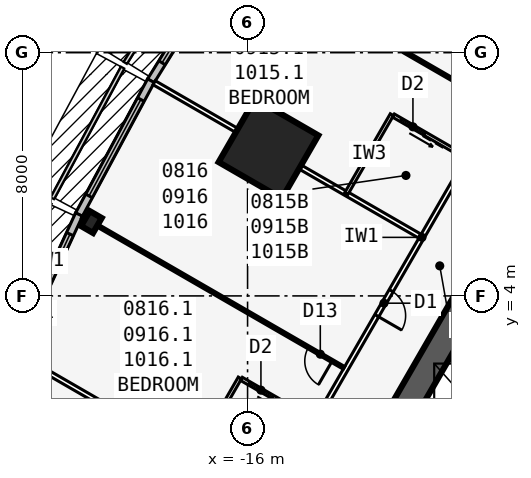
"""IFC4 building model, lengths in metres.
Left out: names, types, materials, properties, quantities, classifications, styles, units other than length and angle.
Written with IfcOpenShell. Run it as: python <this file> out.ifc"""

import sys

from ifc_helpers import new_model, si_unit, direction, frame, frame_2d, origin, origin_2d, place, context, subcontext, project, spatial, rectangle, i_section, extrude, element, fill, save


model = new_model("IFC4")
c1 = context("Model", 3, precision=1e-05, world=origin(), true_north=direction((0.0, 1.0)))
c2 = subcontext(c1, "Body", "Model", "MODEL_VIEW")
j1 = project(units=[si_unit("LENGTHUNIT", "METRE"), si_unit("PLANEANGLEUNIT", "RADIAN")], contexts=[c1])
p1 = place(None, origin())
s1 = spatial("IfcSite", under=j1, at=p1, CompositionType="ELEMENT")
p2 = place(p1, origin())
s2 = spatial("IfcBuilding", under=s1, at=p2, CompositionType="ELEMENT")
p3 = place(p2, frame((0.0, 0.0, 38.7)))
s3 = spatial("IfcBuildingStorey", under=s2, at=p3, CompositionType="ELEMENT", Elevation=38.7)
p4 = place(p3, frame((0.0, 19.052, 0.0), z_axis=(0.0, 0.0, 1.0), x_axis=(-0.499999749417, -0.866025548458, 0.0)))
e1 = element("IfcWall", 1, at=p4, inside=s3, PredefinedType="SHEAR", context=c2, shape_type="SweptSolid", body=[
    extrude(rectangle(XDim=33.0, YDim=0.9, at=frame_2d((16.5, 0.0))), origin(), (0.0, 0.0, 1.0), 3.4),
])
p5 = place(p4, frame((14.15, 0.0, 0.0)))
e2 = element("IfcOpeningElement", 2, at=p5, cuts=e1, PredefinedType="OPENING", context=c2, shape_type="SweptSolid", body=[
    extrude(rectangle(XDim=1.8, YDim=2.13, at=frame_2d((0.9, 1.065))), frame((0.0, 0.46, 0.0), z_axis=(0.0, -1.0, 0.0), x_axis=(1.0, 0.0, 0.0)), (0.0, 0.0, 1.0), 0.92),
])
p6 = place(p4, frame((12.6, 0.0, 0.0)))
e3 = element("IfcOpeningElement", 3, at=p6, cuts=e1, PredefinedType="OPENING", context=c2, shape_type="SweptSolid", body=[
    extrude(rectangle(XDim=1.0, YDim=2.13, at=frame_2d((0.5, 1.065))), frame((0.0, 0.46, 0.0), z_axis=(0.0, -1.0, 0.0), x_axis=(1.0, 0.0, 0.0)), (0.0, 0.0, 1.0), 0.92),
])
p7 = place(p3, frame((-4.929, 3.365, 0.0), z_axis=(0.0, 0.0, 1.0), x_axis=(-0.499991433582, -0.866030349552, 0.0)))
e4 = element("IfcWall", 4, at=p7, inside=s3, PredefinedType="SOLIDWALL", context=c2, shape_type="SweptSolid", body=[
    extrude(rectangle(XDim=10.633, YDim=0.25, at=frame_2d((5.316, 0.0))), origin(), (0.0, 0.0, 1.0), 3.235),
])
p8 = place(p7, frame((9.164, 0.0, 0.0)))
e5 = element("IfcOpeningElement", 5, at=p8, cuts=e4, PredefinedType="OPENING", context=c2, shape_type="SweptSolid", body=[
    extrude(rectangle(XDim=0.9, YDim=2.13, at=frame_2d((0.45, 1.065))), frame((0.0, 0.135, 0.0), z_axis=(0.0, -1.0, 0.0), x_axis=(1.0, 0.0, 0.0)), (0.0, 0.0, 1.0), 0.27),
])
p9 = place(p3, frame((-21.137, 6.43, 0.0), z_axis=(0.0, 0.0, 1.0), x_axis=(-0.866025403784, 0.5, 0.0)))
e6 = element("IfcColumn", 6, at=p9, inside=s3, PredefinedType="COLUMN", context=c2, shape_type="SweptSolid", body=[
    extrude(i_section(OverallWidth=0.455, OverallDepth=0.569, WebThickness=0.078, FlangeThickness=0.125, at=origin_2d()), origin(), (0.0, 0.0, 1.0), 3.4),
])
p10 = place(p3, frame((-15.312, 8.84, 0.0), z_axis=(0.0, 0.0, 1.0), x_axis=(-0.866025403784, 0.5, 0.0)))
e7 = element("IfcColumn", 7, at=p10, inside=s3, PredefinedType="COLUMN", context=c2, shape_type="SweptSolid", body=[
    extrude(rectangle(XDim=2.4, YDim=2.4, at=origin_2d()), origin(), (0.0, 0.0, 1.0), 3.4),
])
p11 = place(p3, frame((-16.551, 15.324, 0.0), z_axis=(0.0, 0.0, 1.0), x_axis=(-0.526132807704, -0.850402415717, 0.0)))
e8 = element("IfcWall", 8, at=p11, inside=s3, PredefinedType="STANDARD", context=c2, shape_type="SweptSolid", body=[
    extrude(rectangle(XDim=5.002, YDim=0.25, at=frame_2d((2.501, 0.0))), origin(), (0.0, 0.0, 1.0), 3.235),
])
p12 = place(p11, frame((0.701, 0.0, 0.45)))
e9 = element("IfcOpeningElement", 9, at=p12, cuts=e8, PredefinedType="OPENING", context=c2, shape_type="SweptSolid", body=[
    extrude(rectangle(XDim=3.6, YDim=2.4, at=frame_2d((1.8, 1.2))), frame((0.0, 0.135, 0.0), z_axis=(0.0, -1.0, 0.0), x_axis=(1.0, 0.0, 0.0)), (0.0, 0.0, 1.0), 0.27),
])
p13 = place(p3, frame((-19.178, 11.077, 0.0), z_axis=(0.0, 0.0, 1.0), x_axis=(-0.473412820489, -0.880840678782, 0.0)))
e10 = element("IfcWall", 10, at=p13, inside=s3, PredefinedType="STANDARD", context=c2, shape_type="SweptSolid", body=[
    extrude(rectangle(XDim=5.002, YDim=0.25, at=frame_2d((2.501, 0.0))), origin(), (0.0, 0.0, 1.0), 3.235),
])
p14 = place(p13, frame((0.701, 0.0, 0.45)))
e11 = element("IfcOpeningElement", 11, at=p14, cuts=e10, PredefinedType="OPENING", context=c2, shape_type="SweptSolid", body=[
    extrude(rectangle(XDim=3.6, YDim=2.4, at=frame_2d((1.8, 1.2))), frame((0.0, 0.135, 0.0), z_axis=(0.0, -1.0, 0.0), x_axis=(1.0, 0.0, 0.0)), (0.0, 0.0, 1.0), 0.27),
])
p15 = place(p3, frame((-21.543, 6.678, 0.0), z_axis=(0.0, 0.0, 1.0), x_axis=(-0.419203100754, -0.907892482796, 0.0)))
e12 = element("IfcWall", 12, at=p15, inside=s3, PredefinedType="STANDARD", context=c2, shape_type="SweptSolid", body=[
    extrude(rectangle(XDim=5.021, YDim=0.25, at=frame_2d((2.51, 0.0))), origin(), (0.0, 0.0, 1.0), 3.235),
])
p16 = place(p15, frame((0.71, 0.0, 0.45)))
e13 = element("IfcOpeningElement", 13, at=p16, cuts=e12, PredefinedType="OPENING", context=c2, shape_type="SweptSolid", body=[
    extrude(rectangle(XDim=3.6, YDim=2.4, at=frame_2d((1.8, 1.2))), frame((0.0, 0.135, 0.0), z_axis=(0.0, -1.0, 0.0), x_axis=(1.0, 0.0, 0.0)), (0.0, 0.0, 1.0), 0.27),
])
p17 = place(p3, frame((-0.5, 22.836, 0.0), z_axis=(0.0, 0.0, 1.0), x_axis=(-0.500001677587, -0.866024435227, 0.0)))
e14 = element("IfcWall", 14, at=p17, inside=s3, PredefinedType="PARTITIONING", context=c2, shape_type="SweptSolid", body=[
    extrude(rectangle(XDim=39.054, YDim=0.15, at=frame_2d((19.527, 0.0))), origin(), (0.0, 0.0, 1.0), 3.235),
])
p18 = place(p17, frame((0.352, 0.0, 0.0)))
e15 = element("IfcOpeningElement", 15, at=p18, cuts=e14, PredefinedType="OPENING", context=c2, shape_type="SweptSolid", body=[
    extrude(rectangle(XDim=0.95, YDim=2.13, at=frame_2d((0.475, 1.065))), frame((0.0, 0.085, 0.0), z_axis=(0.0, -1.0, 0.0), x_axis=(1.0, 0.0, 0.0)), (0.0, 0.0, 1.0), 0.17),
])
p19 = place(p17, frame((5.952, 0.0, 0.0)))
e16 = element("IfcOpeningElement", 16, at=p19, cuts=e14, PredefinedType="OPENING", context=c2, shape_type="SweptSolid", body=[
    extrude(rectangle(XDim=0.95, YDim=2.13, at=frame_2d((0.475, 1.065))), frame((0.0, 0.085, 0.0), z_axis=(0.0, -1.0, 0.0), x_axis=(1.0, 0.0, 0.0)), (0.0, 0.0, 1.0), 0.17),
])
p20 = place(p17, frame((11.552, 0.0, 0.0)))
e17 = element("IfcOpeningElement", 17, at=p20, cuts=e14, PredefinedType="OPENING", context=c2, shape_type="SweptSolid", body=[
    extrude(rectangle(XDim=0.95, YDim=2.13, at=frame_2d((0.475, 1.065))), frame((0.0, 0.085, 0.0), z_axis=(0.0, -1.0, 0.0), x_axis=(1.0, 0.0, 0.0)), (0.0, 0.0, 1.0), 0.17),
])
p21 = place(p17, frame((21.552, 0.0, 0.0)))
e18 = element("IfcOpeningElement", 18, at=p21, cuts=e14, PredefinedType="OPENING", context=c2, shape_type="SweptSolid", body=[
    extrude(rectangle(XDim=0.95, YDim=2.13, at=frame_2d((0.475, 1.065))), frame((0.0, 0.085, 0.0), z_axis=(0.0, -1.0, 0.0), x_axis=(1.0, 0.0, 0.0)), (0.0, 0.0, 1.0), 0.17),
])
p22 = place(p17, frame((30.952, 0.0, 0.0)))
e19 = element("IfcOpeningElement", 19, at=p22, cuts=e14, PredefinedType="OPENING", context=c2, shape_type="SweptSolid", body=[
    extrude(rectangle(XDim=0.95, YDim=2.13, at=frame_2d((0.475, 1.065))), frame((0.0, 0.085, 0.0), z_axis=(0.0, -1.0, 0.0), x_axis=(1.0, 0.0, 0.0)), (0.0, 0.0, 1.0), 0.17),
])
p23 = place(p17, frame((37.752, 0.0, 0.0)))
e20 = element("IfcOpeningElement", 20, at=p23, cuts=e14, PredefinedType="OPENING", context=c2, shape_type="SweptSolid", body=[
    extrude(rectangle(XDim=0.95, YDim=2.13, at=frame_2d((0.475, 1.065))), frame((0.0, 0.085, 0.0), z_axis=(0.0, -1.0, 0.0), x_axis=(1.0, 0.0, 0.0)), (0.0, 0.0, 1.0), 0.17),
])
p24 = place(p3, frame((-7.829, 10.293, 0.0), z_axis=(0.0, 0.0, 1.0), x_axis=(-0.866016302457, 0.50001576363, 0.0)))
e21 = element("IfcWall", 21, at=p24, inside=s3, PredefinedType="PARTITIONING", context=c2, shape_type="SweptSolid", body=[
    extrude(rectangle(XDim=9.943, YDim=0.1, at=frame_2d((4.972, 0.0))), origin(), (0.0, 0.0, 1.0), 2.389),
])
p25 = place(p24, frame((0.45, 0.0, 0.0)))
e22 = element("IfcOpeningElement", 22, at=p25, cuts=e21, PredefinedType="OPENING", context=c2, shape_type="SweptSolid", body=[
    extrude(rectangle(XDim=0.9, YDim=2.13, at=frame_2d((0.45, 1.065))), frame((0.0, 0.06, 0.0), z_axis=(0.0, -1.0, 0.0), x_axis=(1.0, 0.0, 0.0)), (0.0, 0.0, 1.0), 0.12),
])
p26 = place(p3, frame((-10.329, 5.963, 0.0), z_axis=(0.0, 0.0, 1.0), x_axis=(-0.866021688545, 0.500006434927, 0.0)))
e23 = element("IfcWall", 23, at=p26, inside=s3, PredefinedType="PARTITIONING", context=c2, shape_type="SweptSolid", body=[
    extrude(rectangle(XDim=10.096, YDim=0.15, at=frame_2d((5.048, 0.0))), origin(), (0.0, 0.0, 1.0), 2.389),
])
p27 = place(p3, frame((-12.829, 1.633, 0.0), z_axis=(0.0, 0.0, 1.0), x_axis=(-0.866026934769, 0.499997348248, 0.0)))
e24 = element("IfcWall", 24, at=p27, inside=s3, PredefinedType="PARTITIONING", context=c2, shape_type="SweptSolid", body=[
    extrude(rectangle(XDim=9.943, YDim=0.1, at=frame_2d((4.971, 0.0))), origin(), (0.0, 0.0, 1.0), 2.389),
])
p28 = place(p27, frame((0.45, 0.0, 0.0)))
e25 = element("IfcOpeningElement", 25, at=p28, cuts=e24, PredefinedType="OPENING", context=c2, shape_type="SweptSolid", body=[
    extrude(rectangle(XDim=0.9, YDim=2.13, at=frame_2d((0.45, 1.065))), frame((0.0, 0.06, 0.0), z_axis=(0.0, -1.0, 0.0), x_axis=(1.0, 0.0, 0.0)), (0.0, 0.0, 1.0), 0.12),
])
p29 = place(p3, frame((-15.329, -2.697, 0.0), z_axis=(0.0, 0.0, 1.0), x_axis=(-0.866018409083, 0.500012114982, 0.0)))
e26 = element("IfcWall", 26, at=p29, inside=s3, PredefinedType="PARTITIONING", context=c2, shape_type="SweptSolid", body=[
    extrude(rectangle(XDim=9.485, YDim=0.15, at=frame_2d((4.742, 0.0))), origin(), (0.0, 0.0, 1.0), 2.389),
])
p30 = place(p3, frame((-11.253, 9.961, 0.0), z_axis=(0.0, 0.0, 1.0), x_axis=(-0.499990139034, -0.866031096941, 0.0)))
e27 = element("IfcWall", 27, at=p30, inside=s3, PredefinedType="PLUMBINGWALL", context=c2, shape_type="SweptSolid", body=[
    extrude(rectangle(XDim=3.0, YDim=0.12, at=frame_2d((1.5, 0.0))), origin(), (0.0, 0.0, 1.0), 3.235),
])
p31 = place(p3, frame((-8.829, 8.561, 0.0), z_axis=(0.0, 0.0, 1.0), x_axis=(-0.866035715982, 0.499982138324, 0.0)))
e28 = element("IfcWall", 28, at=p31, inside=s3, PredefinedType="PLUMBINGWALL", context=c2, shape_type="SweptSolid", body=[
    extrude(rectangle(XDim=2.74, YDim=0.12, at=frame_2d((1.37, 0.0))), origin(), (0.0, 0.0, 1.0), 3.235),
])
p32 = place(p31, frame((1.55, 0.0, 0.0)))
e29 = element("IfcOpeningElement", 29, at=p32, cuts=e28, PredefinedType="OPENING", context=c2, shape_type="SweptSolid", body=[
    extrude(rectangle(XDim=0.9, YDim=2.13, at=frame_2d((0.45, 1.065))), frame((0.0, 0.07, 0.0), z_axis=(0.0, -1.0, 0.0), x_axis=(1.0, 0.0, 0.0)), (0.0, 0.0, 1.0), 0.14),
])
p33 = place(p3, frame((-16.253, 1.301, 0.0), z_axis=(0.0, 0.0, 1.0), x_axis=(-0.499990139034, -0.866031096941, 0.0)))
e30 = element("IfcWall", 30, at=p33, inside=s3, PredefinedType="PLUMBINGWALL", context=c2, shape_type="SweptSolid", body=[
    extrude(rectangle(XDim=3.0, YDim=0.12, at=frame_2d((1.5, 0.0))), origin(), (0.0, 0.0, 1.0), 3.235),
])
p34 = place(p3, frame((-13.829, -0.099, 0.0), z_axis=(0.0, 0.0, 1.0), x_axis=(-0.865997131366, 0.500048966069, 0.0)))
e31 = element("IfcWall", 31, at=p34, inside=s3, PredefinedType="PLUMBINGWALL", context=c2, shape_type="SweptSolid", body=[
    extrude(rectangle(XDim=2.74, YDim=0.12, at=frame_2d((1.37, 0.0))), origin(), (0.0, 0.0, 1.0), 3.235),
])
p35 = place(p34, frame((1.55, 0.0, 0.0)))
e32 = element("IfcOpeningElement", 32, at=p35, cuts=e31, PredefinedType="OPENING", context=c2, shape_type="SweptSolid", body=[
    extrude(rectangle(XDim=0.9, YDim=2.13, at=frame_2d((0.45, 1.065))), frame((0.0, 0.07, 0.0), z_axis=(0.0, -1.0, 0.0), x_axis=(1.0, 0.0, 0.0)), (0.0, 0.0, 1.0), 0.14),
])
p36 = place(p12, origin())
e33 = element("IfcWindow", 33, at=p36, inside=s3, PartitioningType="SINGLE_PANEL", PredefinedType="WINDOW", context=c2, shape_type="SweptSolid", body=[
    extrude(rectangle(XDim=3.6, YDim=2.4, at=frame_2d((1.8, 1.2))), frame((0.0, 0.03, 0.0), z_axis=(0.0, -1.0, 0.0), x_axis=(1.0, 0.0, 0.0)), (0.0, 0.0, 1.0), 0.06),
])
fill(e9, e33)
p37 = place(p14, origin())
e34 = element("IfcWindow", 34, at=p37, inside=s3, PartitioningType="SINGLE_PANEL", PredefinedType="WINDOW", context=c2, shape_type="SweptSolid", body=[
    extrude(rectangle(XDim=3.6, YDim=2.4, at=frame_2d((1.8, 1.2))), frame((0.0, 0.03, 0.0), z_axis=(0.0, -1.0, 0.0), x_axis=(1.0, 0.0, 0.0)), (0.0, 0.0, 1.0), 0.06),
])
fill(e11, e34)
p38 = place(p16, origin())
e35 = element("IfcWindow", 35, at=p38, inside=s3, PartitioningType="SINGLE_PANEL", PredefinedType="WINDOW", context=c2, shape_type="SweptSolid", body=[
    extrude(rectangle(XDim=3.6, YDim=2.4, at=frame_2d((1.8, 1.2))), frame((0.0, 0.03, 0.0), z_axis=(0.0, -1.0, 0.0), x_axis=(1.0, 0.0, 0.0)), (0.0, 0.0, 1.0), 0.06),
])
fill(e13, e35)
p39 = place(p28, origin())
e36 = element("IfcDoor", 36, at=p39, inside=s3, OperationType="SINGLE_SWING_LEFT", PredefinedType="DOOR", context=c2, shape_type="SweptSolid", body=[
    extrude(rectangle(XDim=0.9, YDim=2.13, at=frame_2d((0.45, 1.065))), frame((0.0, 0.025, 0.0), z_axis=(0.0, -1.0, 0.0), x_axis=(1.0, 0.0, 0.0)), (0.0, 0.0, 1.0), 0.05),
])
fill(e25, e36)
p40 = place(p32, origin())
e37 = element("IfcDoor", 37, at=p40, inside=s3, OperationType="SLIDING_TO_LEFT", PredefinedType="DOOR", context=c2, shape_type="SweptSolid", body=[
    extrude(rectangle(XDim=0.9, YDim=2.13, at=frame_2d((0.45, 1.065))), frame((0.0, 0.025, 0.0), z_axis=(0.0, -1.0, 0.0), x_axis=(1.0, 0.0, 0.0)), (0.0, 0.0, 1.0), 0.05),
])
fill(e29, e37)
p41 = place(p21, origin())
e38 = element("IfcDoor", 38, at=p41, inside=s3, OperationType="SINGLE_SWING_RIGHT", PredefinedType="DOOR", context=c2, shape_type="SweptSolid", body=[
    extrude(rectangle(XDim=0.95, YDim=2.13, at=frame_2d((0.475, 1.065))), frame((0.0, 0.025, 0.0), z_axis=(0.0, -1.0, 0.0), x_axis=(1.0, 0.0, 0.0)), (0.0, 0.0, 1.0), 0.05),
])
fill(e18, e38)
p42 = place(p35, origin())
e39 = element("IfcDoor", 39, at=p42, inside=s3, OperationType="SLIDING_TO_LEFT", PredefinedType="DOOR", context=c2, shape_type="SweptSolid", body=[
    extrude(rectangle(XDim=0.9, YDim=2.13, at=frame_2d((0.45, 1.065))), frame((0.0, 0.025, 0.0), z_axis=(0.0, -1.0, 0.0), x_axis=(1.0, 0.0, 0.0)), (0.0, 0.0, 1.0), 0.05),
])
fill(e32, e39)
save(model, sys.argv[1])
